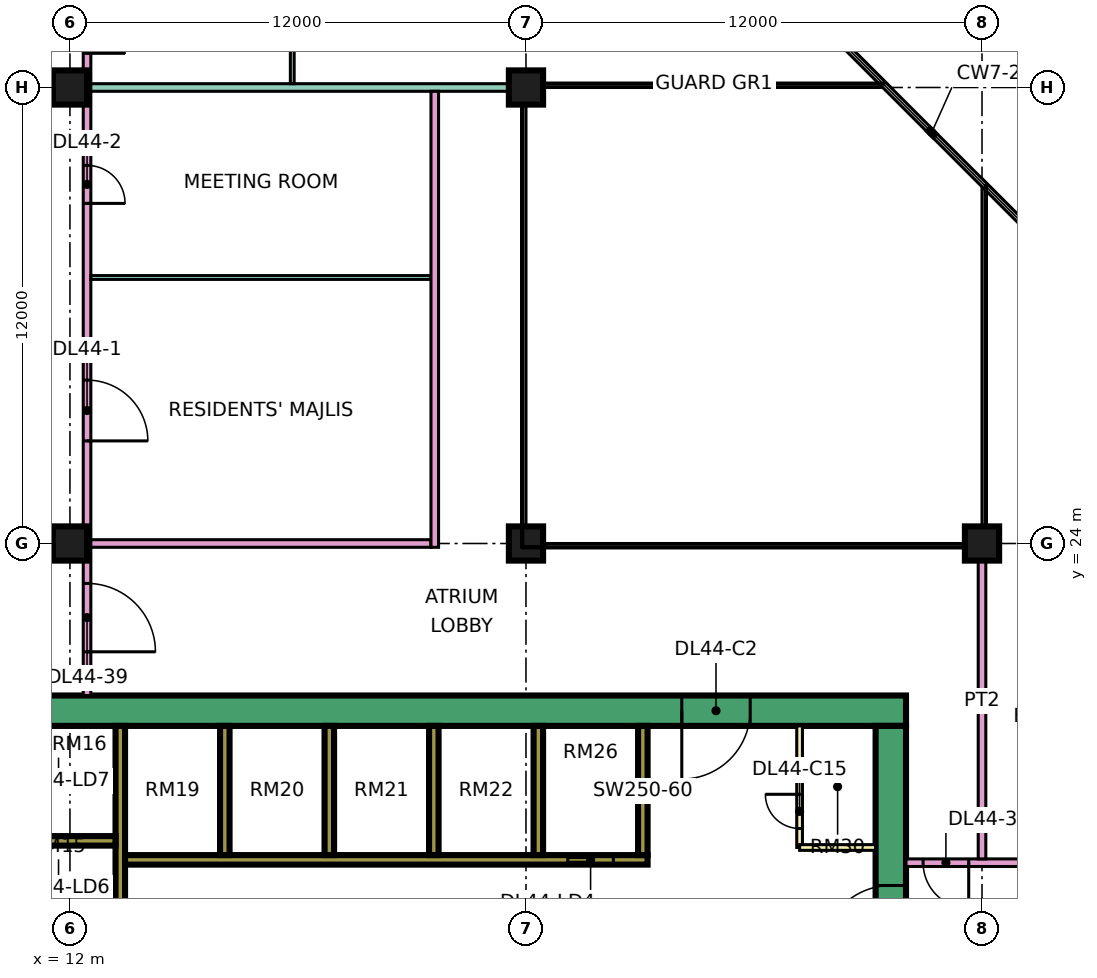
"""IFC4 building model, lengths in metres.
Left out: names, types, materials, properties, quantities, classifications, styles, units other than length and angle.
Written with IfcOpenShell. Run it as: python <this file> out.ifc"""

import sys

from ifc_helpers import new_model, si_unit, direction, frame, frame_2d, origin, origin_2d, place, context, subcontext, project, spatial, rectangle, extrude, element, fill, save


model = new_model("IFC4")
c1 = context("Model", 3, precision=1e-05, world=origin(), true_north=direction((0.0, 1.0)))
c2 = subcontext(c1, "Body", "Model", "MODEL_VIEW")
j1 = project(units=[si_unit("LENGTHUNIT", "METRE"), si_unit("PLANEANGLEUNIT", "RADIAN")], contexts=[c1])
p1 = place(None, origin())
s1 = spatial("IfcSite", under=j1, at=p1, CompositionType="ELEMENT")
p2 = place(p1, origin())
s2 = spatial("IfcBuilding", under=s1, at=p2, CompositionType="ELEMENT")
p3 = place(p2, frame((0.0, 0.0, 191.15)))
s3 = spatial("IfcBuildingStorey", under=s2, at=p3, CompositionType="ELEMENT", Elevation=191.15)
for number, where, z_axis, x_axis in (
    (1, (12.0, 24.0, 0.0), (0.0, 0.0, 1.0), (1.0, 0.0, 0.0)),
    (2, (12.0, 36.0, 0.0), (0.0, 0.0, 1.0), (1.0, 0.0, 0.0)),
    (3, (24.0, 24.0, 0.0), (0.0, 0.0, 1.0), (1.0, 0.0, 0.0)),
    (4, (24.0, 36.0, 0.0), (0.0, 0.0, 1.0), (1.0, 0.0, 0.0)),
    (5, (36.0, 24.0, 0.0), (0.0, 0.0, 1.0), (1.0, 0.0, 0.0)),
):
    element("IfcColumn", number, at=place(p3, frame(where, z_axis=z_axis, x_axis=x_axis)), inside=s3, PredefinedType="COLUMN", context=c2, shape_type="SweptSolid", body=[
        extrude(rectangle(XDim=0.9, YDim=0.9, at=origin_2d()), origin(), (0.0, 0.0, 1.0), 3.75),
    ])
p4 = place(p3, frame((9.0, 19.6, 0.0), z_axis=(0.0, 0.0, 1.0), x_axis=(1.0, 0.0, 0.0)))
e6 = element("IfcWall", 6, at=p4, inside=s3, PredefinedType="SHEAR", context=c2, shape_type="SweptSolid", body=[
    extrude(rectangle(XDim=25.0, YDim=0.8, at=frame_2d((12.5, 0.0))), origin(), (0.0, 0.0, 1.0), 3.75),
])
p5 = place(p4, frame((19.1, 0.0, 0.0)))
e7 = element("IfcOpeningElement", 7, at=p5, cuts=e6, PredefinedType="OPENING", context=c2, shape_type="SweptSolid", body=[
    extrude(rectangle(XDim=1.8, YDim=2.4, at=frame_2d((0.9, 1.2))), frame((0.0, 0.41, 0.0), z_axis=(0.0, -1.0, 0.0), x_axis=(1.0, 0.0, 0.0)), (0.0, 0.0, 1.0), 0.82),
])
p6 = place(p3, frame((33.6, 7.8, 0.0), z_axis=(0.0, 0.0, 1.0), x_axis=(0.0, 1.0, 0.0)))
e8 = element("IfcWall", 8, at=p6, inside=s3, PredefinedType="SHEAR", context=c2, shape_type="SweptSolid", body=[
    extrude(rectangle(XDim=11.4, YDim=0.8, at=frame_2d((5.7, 0.0))), origin(), (0.0, 0.0, 1.0), 3.75),
])
p7 = place(p6, frame((5.4, 0.0, 0.0)))
e9 = element("IfcOpeningElement", 9, at=p7, cuts=e8, PredefinedType="OPENING", context=c2, shape_type="SweptSolid", body=[
    extrude(rectangle(XDim=1.8, YDim=2.4, at=frame_2d((0.9, 1.2))), frame((0.0, 0.41, 0.0), z_axis=(0.0, -1.0, 0.0), x_axis=(1.0, 0.0, 0.0)), (0.0, 0.0, 1.0), 0.82),
])
p8 = place(p3, frame((13.325, 7.8, 0.0), z_axis=(0.0, 0.0, 1.0), x_axis=(0.0, 1.0, 0.0)))
e10 = element("IfcWall", 10, at=p8, inside=s3, PredefinedType="SHEAR", context=c2, shape_type="SweptSolid", body=[
    extrude(rectangle(XDim=11.4, YDim=0.25, at=frame_2d((5.7, 0.0))), origin(), (0.0, 0.0, 1.0), 3.75),
])
p9 = place(p3, frame((13.45, 15.675, 0.0), z_axis=(0.0, 0.0, 1.0), x_axis=(1.0, 0.0, 0.0)))
e11 = element("IfcWall", 11, at=p9, inside=s3, PredefinedType="SHEAR", context=c2, shape_type="SweptSolid", body=[
    extrude(rectangle(XDim=13.75, YDim=0.25, at=frame_2d((6.875, 0.0))), origin(), (0.0, 0.0, 1.0), 3.75),
])
p10 = place(p9, frame((11.65, 0.0, 0.0)))
e12 = element("IfcOpeningElement", 12, at=p10, cuts=e11, PredefinedType="OPENING", context=c2, shape_type="SweptSolid", body=[
    extrude(rectangle(XDim=1.2, YDim=2.2, at=frame_2d((0.6, 1.1))), frame((0.0, 0.135, 0.0), z_axis=(0.0, -1.0, 0.0), x_axis=(1.0, 0.0, 0.0)), (0.0, 0.0, 1.0), 0.27),
])
p11 = place(p3, frame((10.2, 16.175, 0.0), z_axis=(0.0, 0.0, 1.0), x_axis=(1.0, 0.0, 0.0)))
e13 = element("IfcWall", 13, at=p11, inside=s3, PredefinedType="SHEAR", context=c2, shape_type="SweptSolid", body=[
    extrude(rectangle(XDim=3.0, YDim=0.25, at=frame_2d((1.5, 0.0))), origin(), (0.0, 0.0, 1.0), 3.75),
])
for number, where, z_axis, x_axis in (
    (14, (16.075, 15.8, 0.0), (0.0, 0.0, 1.0), (0.0, 1.0, 0.0)),
    (15, (18.825, 15.8, 0.0), (0.0, 0.0, 1.0), (0.0, 1.0, 0.0)),
    (16, (21.575, 15.8, 0.0), (0.0, 0.0, 1.0), (0.0, 1.0, 0.0)),
    (17, (24.325, 15.8, 0.0), (0.0, 0.0, 1.0), (0.0, 1.0, 0.0)),
    (18, (27.075, 15.8, 0.0), (0.0, 0.0, 1.0), (0.0, 1.0, 0.0)),
):
    element("IfcWall", number, at=place(p3, frame(where, z_axis=z_axis, x_axis=x_axis)), inside=s3, PredefinedType="SHEAR", context=c2, shape_type="SweptSolid", body=[
        extrude(rectangle(XDim=3.4, YDim=0.25, at=frame_2d((1.7, 0.0))), origin(), (0.0, 0.0, 1.0), 3.75),
    ])
p12 = place(p3, frame((31.2, 16.0, 0.0), z_axis=(0.0, 0.0, 1.0), x_axis=(0.0, 1.0, 0.0)))
e19 = element("IfcWall", 19, at=p12, inside=s3, PredefinedType="PARTITIONING", context=c2, shape_type="SweptSolid", body=[
    extrude(rectangle(XDim=3.2, YDim=0.15, at=frame_2d((1.6, 0.0))), origin(), (0.0, 0.0, 1.0), 3.35),
])
p13 = place(p12, frame((0.5, 0.0, 0.0)))
e20 = element("IfcOpeningElement", 20, at=p13, cuts=e19, PredefinedType="OPENING", context=c2, shape_type="SweptSolid", body=[
    extrude(rectangle(XDim=0.9, YDim=2.1, at=frame_2d((0.45, 1.05))), frame((0.0, 0.085, 0.0), z_axis=(0.0, -1.0, 0.0), x_axis=(1.0, 0.0, 0.0)), (0.0, 0.0, 1.0), 0.17),
])
p14 = place(p3, frame((31.2, 16.0, 0.0), z_axis=(0.0, 0.0, 1.0), x_axis=(1.0, 0.0, 0.0)))
e21 = element("IfcWall", 21, at=p14, inside=s3, PredefinedType="PARTITIONING", context=c2, shape_type="SweptSolid", body=[
    extrude(rectangle(XDim=2.0, YDim=0.15, at=frame_2d((1.0, 0.0))), origin(), (0.0, 0.0, 1.0), 3.35),
])
p15 = place(p3, frame((12.45, 20.0, 0.0), z_axis=(0.0, 0.0, 1.0), x_axis=(0.0, 1.0, 0.0)))
e22 = element("IfcWall", 22, at=p15, inside=s3, PredefinedType="PARTITIONING", context=c2, shape_type="SweptSolid", body=[
    extrude(rectangle(XDim=43.0, YDim=0.2, at=frame_2d((21.5, 0.0))), origin(), (0.0, 0.0, 1.0), 3.35),
])
p16 = place(p15, frame((6.7, 0.0, 0.0)))
e23 = element("IfcOpeningElement", 23, at=p16, cuts=e22, PredefinedType="OPENING", context=c2, shape_type="SweptSolid", body=[
    extrude(rectangle(XDim=1.6, YDim=2.1, at=frame_2d((0.8, 1.05))), frame((0.0, 0.11, 0.0), z_axis=(0.0, -1.0, 0.0), x_axis=(1.0, 0.0, 0.0)), (0.0, 0.0, 1.0), 0.22),
])
p17 = place(p15, frame((12.95, 0.0, 0.0)))
e24 = element("IfcOpeningElement", 24, at=p17, cuts=e22, PredefinedType="OPENING", context=c2, shape_type="SweptSolid", body=[
    extrude(rectangle(XDim=1.0, YDim=2.1, at=frame_2d((0.5, 1.05))), frame((0.0, 0.11, 0.0), z_axis=(0.0, -1.0, 0.0), x_axis=(1.0, 0.0, 0.0)), (0.0, 0.0, 1.0), 0.22),
])
p18 = place(p15, frame((16.9, 0.0, 0.0)))
e25 = element("IfcOpeningElement", 25, at=p18, cuts=e22, PredefinedType="OPENING", context=c2, shape_type="SweptSolid", body=[
    extrude(rectangle(XDim=1.0, YDim=2.1, at=frame_2d((0.5, 1.05))), frame((0.0, 0.11, 0.0), z_axis=(0.0, -1.0, 0.0), x_axis=(1.0, 0.0, 0.0)), (0.0, 0.0, 1.0), 0.22),
])
p19 = place(p15, frame((40.75, 0.0, 0.0)))
e26 = element("IfcOpeningElement", 26, at=p19, cuts=e22, PredefinedType="OPENING", context=c2, shape_type="SweptSolid", body=[
    extrude(rectangle(XDim=1.0, YDim=2.1, at=frame_2d((0.5, 1.05))), frame((0.0, 0.11, 0.0), z_axis=(0.0, -1.0, 0.0), x_axis=(1.0, 0.0, 0.0)), (0.0, 0.0, 1.0), 0.22),
])
p20 = place(p15, frame((1.15, 0.0, 0.0)))
e27 = element("IfcOpeningElement", 27, at=p20, cuts=e22, PredefinedType="OPENING", context=c2, shape_type="SweptSolid", body=[
    extrude(rectangle(XDim=1.8, YDim=2.1, at=frame_2d((0.9, 1.05))), frame((0.0, 0.11, 0.0), z_axis=(0.0, -1.0, 0.0), x_axis=(1.0, 0.0, 0.0)), (0.0, 0.0, 1.0), 0.22),
])
p21 = place(p15, frame((28.6, 0.0, 0.0)))
e28 = element("IfcOpeningElement", 28, at=p21, cuts=e22, PredefinedType="OPENING", context=c2, shape_type="SweptSolid", body=[
    extrude(rectangle(XDim=1.8, YDim=2.1, at=frame_2d((0.9, 1.05))), frame((0.0, 0.11, 0.0), z_axis=(0.0, -1.0, 0.0), x_axis=(1.0, 0.0, 0.0)), (0.0, 0.0, 1.0), 0.22),
])
p22 = place(p3, frame((12.55, 24.0, 0.0), z_axis=(0.0, 0.0, 1.0), x_axis=(1.0, 0.0, 0.0)))
e29 = element("IfcWall", 29, at=p22, inside=s3, PredefinedType="PARTITIONING", context=c2, shape_type="SweptSolid", body=[
    extrude(rectangle(XDim=8.95, YDim=0.2, at=frame_2d((4.475, 0.0))), origin(), (0.0, 0.0, 1.0), 3.35),
])
p23 = place(p3, frame((12.55, 31.0, 0.0), z_axis=(0.0, 0.0, 1.0), x_axis=(1.0, 0.0, 0.0)))
e30 = element("IfcWall", 30, at=p23, inside=s3, PredefinedType="PARTITIONING", context=c2, shape_type="SweptSolid", body=[
    extrude(rectangle(XDim=8.95, YDim=0.1, at=frame_2d((4.475, 0.0))), origin(), (0.0, 0.0, 1.0), 3.35),
])
p24 = place(p3, frame((12.55, 36.0, 0.0), z_axis=(0.0, 0.0, 1.0), x_axis=(1.0, 0.0, 0.0)))
e31 = element("IfcWall", 31, at=p24, inside=s3, PredefinedType="PARTITIONING", context=c2, shape_type="SweptSolid", body=[
    extrude(rectangle(XDim=11.45, YDim=0.2, at=frame_2d((5.725, 0.0))), origin(), (0.0, 0.0, 1.0), 3.35),
])
p25 = place(p3, frame((17.85, 36.1, 0.0), z_axis=(0.0, 0.0, 1.0), x_axis=(0.0, 1.0, 0.0)))
e32 = element("IfcWall", 32, at=p25, inside=s3, PredefinedType="PARTITIONING", context=c2, shape_type="SweptSolid", body=[
    extrude(rectangle(XDim=2.85, YDim=0.1, at=frame_2d((1.425, 0.0))), origin(), (0.0, 0.0, 1.0), 3.35),
])
p26 = place(p25, frame((0.95, 0.0, 0.0)))
e33 = element("IfcOpeningElement", 33, at=p26, cuts=e32, PredefinedType="OPENING", context=c2, shape_type="SweptSolid", body=[
    extrude(rectangle(XDim=0.9, YDim=2.1, at=frame_2d((0.45, 1.05))), frame((0.0, 0.06, 0.0), z_axis=(0.0, -1.0, 0.0), x_axis=(1.0, 0.0, 0.0)), (0.0, 0.0, 1.0), 0.12),
])
p27 = place(p3, frame((21.6, 23.9, 0.0), z_axis=(0.0, 0.0, 1.0), x_axis=(0.0, 1.0, 0.0)))
e34 = element("IfcWall", 34, at=p27, inside=s3, PredefinedType="PARTITIONING", context=c2, shape_type="SweptSolid", body=[
    extrude(rectangle(XDim=12.0, YDim=0.2, at=frame_2d((6.0, 0.0))), origin(), (0.0, 0.0, 1.0), 3.35),
])
p28 = place(p3, frame((34.0, 15.6, 0.0), z_axis=(0.0, 0.0, 1.0), x_axis=(1.0, 0.0, 0.0)))
e35 = element("IfcWall", 35, at=p28, inside=s3, PredefinedType="PARTITIONING", context=c2, shape_type="SweptSolid", body=[
    extrude(rectangle(XDim=10.35, YDim=0.2, at=frame_2d((5.175, 0.0))), origin(), (0.0, 0.0, 1.0), 3.35),
])
p29 = place(p28, frame((5.6, 0.0, 0.0)))
e36 = element("IfcOpeningElement", 36, at=p29, cuts=e35, PredefinedType="OPENING", context=c2, shape_type="SweptSolid", body=[
    extrude(rectangle(XDim=1.0, YDim=2.1, at=frame_2d((0.5, 1.05))), frame((0.0, 0.11, 0.0), z_axis=(0.0, -1.0, 0.0), x_axis=(1.0, 0.0, 0.0)), (0.0, 0.0, 1.0), 0.22),
])
p30 = place(p28, frame((0.45, 0.0, 0.0)))
e37 = element("IfcOpeningElement", 37, at=p30, cuts=e35, PredefinedType="OPENING", context=c2, shape_type="SweptSolid", body=[
    extrude(rectangle(XDim=1.2, YDim=2.1, at=frame_2d((0.6, 1.05))), frame((0.0, 0.11, 0.0), z_axis=(0.0, -1.0, 0.0), x_axis=(1.0, 0.0, 0.0)), (0.0, 0.0, 1.0), 0.22),
])
p31 = place(p3, frame((36.0, 15.7, 0.0), z_axis=(0.0, 0.0, 1.0), x_axis=(0.0, 1.0, 0.0)))
e38 = element("IfcWall", 38, at=p31, inside=s3, PredefinedType="PARTITIONING", context=c2, shape_type="SweptSolid", body=[
    extrude(rectangle(XDim=8.3, YDim=0.2, at=frame_2d((4.15, 0.0))), origin(), (0.0, 0.0, 1.0), 3.35),
])
p32 = place(p10, origin())
e39 = element("IfcDoor", 39, at=p32, inside=s3, OperationType="DOUBLE_DOOR_SLIDING", PredefinedType="DOOR", context=c2, shape_type="SweptSolid", body=[
    extrude(rectangle(XDim=1.2, YDim=2.2, at=frame_2d((0.6, 1.1))), frame((0.0, 0.025, 0.0), z_axis=(0.0, -1.0, 0.0), x_axis=(1.0, 0.0, 0.0)), (0.0, 0.0, 1.0), 0.05),
])
fill(e12, e39)
p33 = place(p7, origin())
e40 = element("IfcDoor", 40, at=p33, inside=s3, OperationType="DOUBLE_DOOR_SINGLE_SWING", PredefinedType="DOOR", context=c2, shape_type="SweptSolid", body=[
    extrude(rectangle(XDim=1.8, YDim=2.4, at=frame_2d((0.9, 1.2))), frame((0.0, 0.025, 0.0), z_axis=(0.0, -1.0, 0.0), x_axis=(1.0, 0.0, 0.0)), (0.0, 0.0, 1.0), 0.05),
])
fill(e9, e40)
p34 = place(p5, frame((1.8, 0.0, 0.0), z_axis=(0.0, 0.0, 1.0), x_axis=(-1.0, 0.0, 0.0)))
e41 = element("IfcDoor", 41, at=p34, inside=s3, OperationType="DOUBLE_DOOR_SINGLE_SWING", PredefinedType="DOOR", context=c2, shape_type="SweptSolid", body=[
    extrude(rectangle(XDim=1.8, YDim=2.4, at=frame_2d((0.9, 1.2))), frame((0.0, 0.025, 0.0), z_axis=(0.0, -1.0, 0.0), x_axis=(1.0, 0.0, 0.0)), (0.0, 0.0, 1.0), 0.05),
])
fill(e7, e41)
p35 = place(p13, frame((0.9, 0.0, 0.0), z_axis=(0.0, 0.0, 1.0), x_axis=(-1.0, 0.0, 0.0)))
e42 = element("IfcDoor", 42, at=p35, inside=s3, OperationType="SINGLE_SWING_RIGHT", PredefinedType="DOOR", context=c2, shape_type="SweptSolid", body=[
    extrude(rectangle(XDim=0.9, YDim=2.1, at=frame_2d((0.45, 1.05))), frame((0.0, 0.025, 0.0), z_axis=(0.0, -1.0, 0.0), x_axis=(1.0, 0.0, 0.0)), (0.0, 0.0, 1.0), 0.05),
])
fill(e20, e42)
p36 = place(p16, frame((1.6, 0.0, 0.0), z_axis=(0.0, 0.0, 1.0), x_axis=(-1.0, 0.0, 0.0)))
e43 = element("IfcDoor", 43, at=p36, inside=s3, OperationType="DOUBLE_DOOR_SINGLE_SWING", PredefinedType="DOOR", context=c2, shape_type="SweptSolid", body=[
    extrude(rectangle(XDim=1.6, YDim=2.1, at=frame_2d((0.8, 1.05))), frame((0.0, 0.025, 0.0), z_axis=(0.0, -1.0, 0.0), x_axis=(1.0, 0.0, 0.0)), (0.0, 0.0, 1.0), 0.05),
])
fill(e23, e43)
p37 = place(p17, frame((1.0, 0.0, 0.0), z_axis=(0.0, 0.0, 1.0), x_axis=(-1.0, 0.0, 0.0)))
e44 = element("IfcDoor", 44, at=p37, inside=s3, OperationType="SINGLE_SWING_LEFT", PredefinedType="DOOR", context=c2, shape_type="SweptSolid", body=[
    extrude(rectangle(XDim=1.0, YDim=2.1, at=frame_2d((0.5, 1.05))), frame((0.0, 0.025, 0.0), z_axis=(0.0, -1.0, 0.0), x_axis=(1.0, 0.0, 0.0)), (0.0, 0.0, 1.0), 0.05),
])
fill(e24, e44)
p38 = place(p18, frame((1.0, 0.0, 0.0), z_axis=(0.0, 0.0, 1.0), x_axis=(-1.0, 0.0, 0.0)))
e45 = element("IfcDoor", 45, at=p38, inside=s3, OperationType="SINGLE_SWING_LEFT", PredefinedType="DOOR", context=c2, shape_type="SweptSolid", body=[
    extrude(rectangle(XDim=1.0, YDim=2.1, at=frame_2d((0.5, 1.05))), frame((0.0, 0.025, 0.0), z_axis=(0.0, -1.0, 0.0), x_axis=(1.0, 0.0, 0.0)), (0.0, 0.0, 1.0), 0.05),
])
fill(e25, e45)
p39 = place(p30, origin())
e46 = element("IfcDoor", 46, at=p39, inside=s3, OperationType="SINGLE_SWING_RIGHT", PredefinedType="DOOR", context=c2, shape_type="SweptSolid", body=[
    extrude(rectangle(XDim=1.2, YDim=2.1, at=frame_2d((0.6, 1.05))), frame((0.0, 0.025, 0.0), z_axis=(0.0, -1.0, 0.0), x_axis=(1.0, 0.0, 0.0)), (0.0, 0.0, 1.0), 0.05),
])
fill(e37, e46)
p40 = place(p20, frame((1.8, 0.0, 0.0), z_axis=(0.0, 0.0, 1.0), x_axis=(-1.0, 0.0, 0.0)))
e47 = element("IfcDoor", 47, at=p40, inside=s3, OperationType="DOUBLE_DOOR_SINGLE_SWING", PredefinedType="DOOR", context=c2, shape_type="SweptSolid", body=[
    extrude(rectangle(XDim=1.8, YDim=2.1, at=frame_2d((0.9, 1.05))), frame((0.0, 0.025, 0.0), z_axis=(0.0, -1.0, 0.0), x_axis=(1.0, 0.0, 0.0)), (0.0, 0.0, 1.0), 0.05),
])
fill(e27, e47)
save(model, sys.argv[1])
